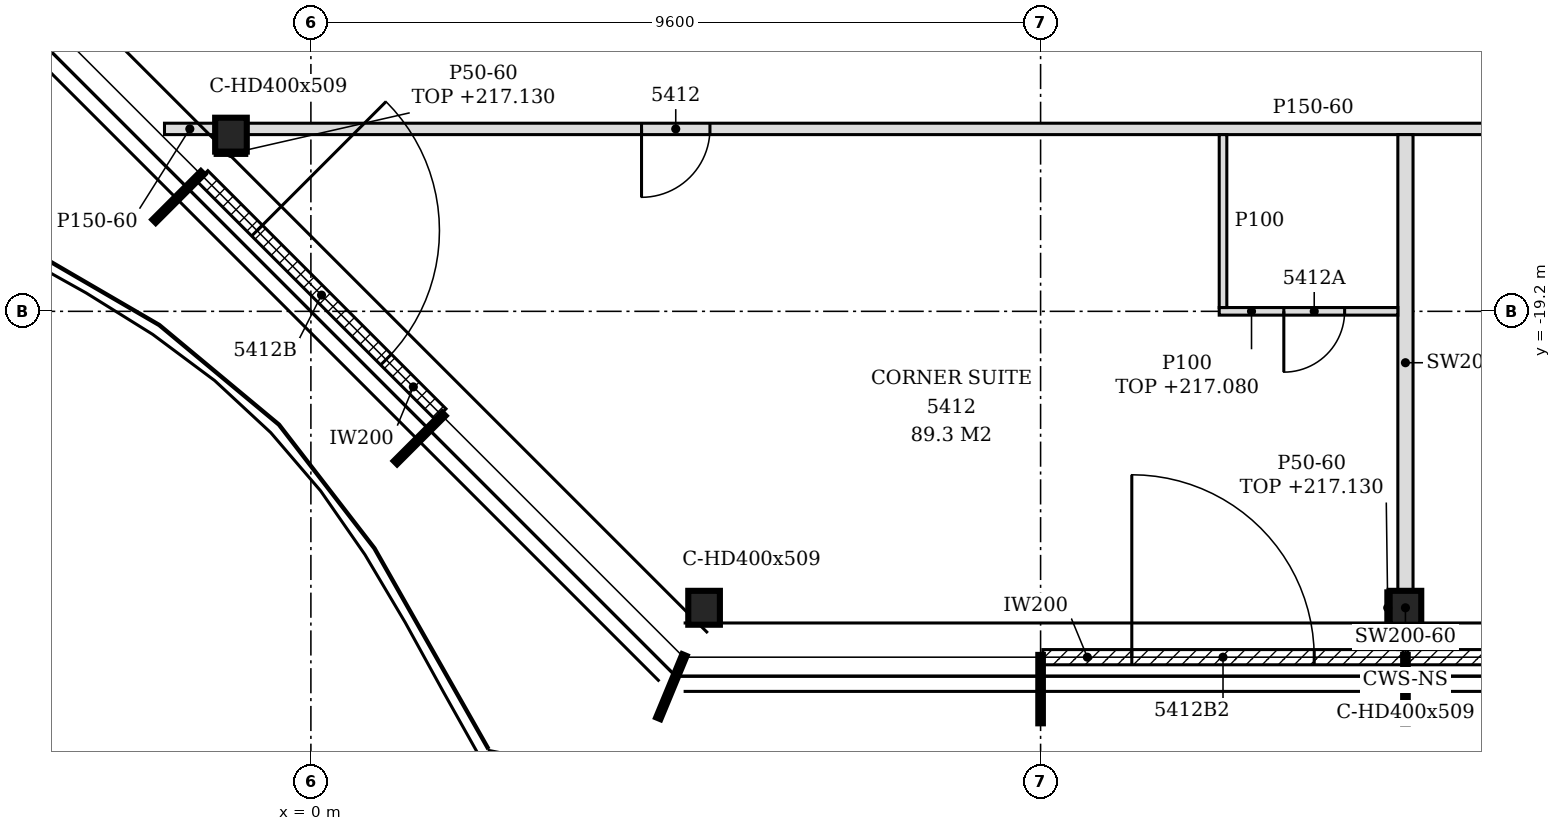
"""IFC4 building model, lengths in metres.
Left out: names, types, materials, properties, quantities, classifications, styles, units other than length and angle.
Written with IfcOpenShell. Run it as: python <this file> out.ifc"""

import sys

from ifc_helpers import new_model, si_unit, direction, frame, frame_2d, origin, origin_2d, place, context, subcontext, project, spatial, polyline, rectangle, i_section, outline, extrude, element, fill, save


model = new_model("IFC4")
c1 = context("Model", 3, precision=1e-05, world=origin(), true_north=direction((0.0, 1.0)))
c2 = subcontext(c1, "Body", "Model", "MODEL_VIEW")
j1 = project(units=[si_unit("LENGTHUNIT", "METRE"), si_unit("PLANEANGLEUNIT", "RADIAN")], contexts=[c1])
p1 = place(None, origin())
s1 = spatial("IfcSite", under=j1, at=p1, CompositionType="ELEMENT")
p2 = place(p1, origin())
s2 = spatial("IfcBuilding", under=s1, at=p2, CompositionType="ELEMENT")
p3 = place(p2, frame((0.0, 0.0, 214.2)))
s3 = spatial("IfcBuildingStorey", under=s2, at=p3, CompositionType="ELEMENT", Elevation=214.2)
for number, where, z_axis, x_axis in (
    (1, (5.173, -23.1, -0.15), (0.0, 0.0, 1.0), (1.0, 0.0, 0.0)),
    (2, (14.4, -23.1, -0.15), (0.0, 0.0, 1.0), (1.0, 0.0, 0.0)),
    (3, (-1.052, -16.876, -0.15), (0.0, 0.0, 1.0), (1.0, 0.0, 0.0)),
):
    element("IfcColumn", number, at=place(p3, frame(where, z_axis=z_axis, x_axis=x_axis)), inside=s3, PredefinedType="COLUMN", context=c2, shape_type="SweptSolid", body=[
        extrude(i_section(OverallWidth=0.416, OverallDepth=0.446, WebThickness=0.039, FlangeThickness=0.063, FilletRadius=0.015, at=origin_2d()), origin(), (0.0, 0.0, 1.0), 3.6),
    ])
p4 = place(p3, frame((9.63, -23.75, 0.0), z_axis=(0.0, 0.0, 1.0), x_axis=(1.0, 0.0, 0.0)))
e4 = element("IfcWall", 4, at=p4, inside=s3, PredefinedType="NOTDEFINED", context=c2, shape_type="SweptSolid", body=[
    extrude(rectangle(XDim=4.74, YDim=0.2, at=frame_2d((2.37, 0.0))), origin(), (0.0, 0.0, 1.0), 3.45),
])
p5 = place(p4, frame((1.17, 0.0, 0.0)))
e5 = element("IfcOpeningElement", 5, at=p5, cuts=e4, PredefinedType="OPENING", context=c2, shape_type="SweptSolid", body=[
    extrude(rectangle(XDim=2.4, YDim=2.4, at=frame_2d((1.2, 1.2))), frame((0.0, 0.11, 0.0), z_axis=(0.0, -1.0, 0.0), x_axis=(1.0, 0.0, 0.0)), (0.0, 0.0, 1.0), 0.22),
])
p6 = place(p3, frame((14.43, -23.75, 0.0), z_axis=(0.0, 0.0, 1.0), x_axis=(1.0, 0.0, 0.0)))
e6 = element("IfcWall", 6, at=p6, inside=s3, PredefinedType="NOTDEFINED", context=c2, shape_type="SweptSolid", body=[
    extrude(rectangle(XDim=4.74, YDim=0.2, at=frame_2d((2.37, 0.0))), origin(), (0.0, 0.0, 1.0), 3.45),
])
p7 = place(p6, frame((1.17, 0.0, 0.0)))
e7 = element("IfcOpeningElement", 7, at=p7, cuts=e6, PredefinedType="OPENING", context=c2, shape_type="SweptSolid", body=[
    extrude(rectangle(XDim=2.4, YDim=2.4, at=frame_2d((1.2, 1.2))), frame((0.0, 0.11, 0.0), z_axis=(0.0, -1.0, 0.0), x_axis=(1.0, 0.0, 0.0)), (0.0, 0.0, 1.0), 0.22),
])
p8 = place(p3, frame((-1.427, -17.42, 0.0), z_axis=(0.0, 0.0, 1.0), x_axis=(0.707106781187, -0.707106781187, 0.0)))
e8 = element("IfcWall", 8, at=p8, inside=s3, PredefinedType="NOTDEFINED", context=c2, shape_type="SweptSolid", body=[
    extrude(rectangle(XDim=4.431, YDim=0.2, at=frame_2d((2.216, 0.0))), origin(), (0.0, 0.0, 1.0), 3.45),
])
p9 = place(p8, frame((1.015, 0.0, 0.0)))
e9 = element("IfcOpeningElement", 9, at=p9, cuts=e8, PredefinedType="OPENING", context=c2, shape_type="SweptSolid", body=[
    extrude(rectangle(XDim=2.4, YDim=2.4, at=frame_2d((1.2, 1.2))), frame((0.0, 0.11, 0.0), z_axis=(0.0, -1.0, 0.0), x_axis=(1.0, 0.0, 0.0)), (0.0, 0.0, 1.0), 0.22),
])
p10 = place(p3, frame((14.4, -23.65, 0.0), z_axis=(0.0, 0.0, 1.0), x_axis=(0.0, 1.0, 0.0)))
e10 = element("IfcWall", 10, at=p10, inside=s3, PredefinedType="PARTITIONING", context=c2, shape_type="SweptSolid", body=[
    extrude(rectangle(XDim=0.327, YDim=0.2, at=frame_2d((0.164, 0.0))), origin(), (0.0, 0.0, 1.0), 3.45),
])
p11 = place(p3, frame((14.4, -22.877, 0.0), z_axis=(0.0, 0.0, 1.0), x_axis=(0.0, 1.0, 0.0)))
e11 = element("IfcWall", 11, at=p11, inside=s3, PredefinedType="PARTITIONING", context=c2, shape_type="SweptSolid", body=[
    extrude(outline(polyline([(0.0, 0.0), (6.002, 0.0), (6.002, 3.45), (3.782, 3.45), (3.78, 2.88), (3.572, 2.88), (3.57, 3.45), (0.0, 3.45), (0.0, 0.0)])), frame((0.0, 0.1, 0.0), z_axis=(0.0, -1.0, 0.0), x_axis=(1.0, 0.0, 0.0)), (0.0, 0.0, 1.0), 0.2),
])
p12 = place(p3, frame((11.95, -19.2, 0.0), z_axis=(0.0, 0.0, 1.0), x_axis=(1.0, 0.0, 0.0)))
e12 = element("IfcWall", 12, at=p12, inside=s3, PredefinedType="PARTITIONING", context=c2, shape_type="SweptSolid", body=[
    extrude(rectangle(XDim=2.35, YDim=0.1, at=frame_2d((1.175, 0.0))), origin(), (0.0, 0.0, 1.0), 2.88),
])
p13 = place(p12, frame((0.85, 0.0, 0.0)))
e13 = element("IfcOpeningElement", 13, at=p13, cuts=e12, PredefinedType="OPENING", context=c2, shape_type="SweptSolid", body=[
    extrude(rectangle(XDim=0.8, YDim=2.1, at=frame_2d((0.4, 1.05))), frame((0.0, 0.06, 0.0), z_axis=(0.0, -1.0, 0.0), x_axis=(1.0, 0.0, 0.0)), (0.0, 0.0, 1.0), 0.12),
])
p14 = place(p3, frame((12.0, -19.15, 0.0), z_axis=(0.0, 0.0, 1.0), x_axis=(0.0, 1.0, 0.0)))
e14 = element("IfcWall", 14, at=p14, inside=s3, PredefinedType="PARTITIONING", context=c2, shape_type="SweptSolid", body=[
    extrude(outline(polyline([(0.0, 0.0), (2.275, 0.0), (2.275, 3.45), (0.055, 3.45), (0.053, 2.88), (0.0, 2.88), (0.0, 0.0)])), frame((0.0, 0.05, 0.0), z_axis=(0.0, -1.0, 0.0), x_axis=(1.0, 0.0, 0.0)), (0.0, 0.0, 1.0), 0.1),
])
p15 = place(p3, frame((-1.926, -16.8, 0.0), z_axis=(0.0, 0.0, 1.0), x_axis=(1.0, 0.0, 0.0)))
e15 = element("IfcWall", 15, at=p15, inside=s3, PredefinedType="PARTITIONING", context=c2, shape_type="SweptSolid", body=[
    extrude(outline(polyline([(0.0, 0.0), (0.667, 0.0), (0.667, 2.63), (0.229, 2.63), (0.227, 3.45), (0.0, 3.45), (0.0, 0.0)])), frame((0.0, 0.075, 0.0), z_axis=(0.0, -1.0, 0.0), x_axis=(1.0, 0.0, 0.0)), (0.0, 0.0, 1.0), 0.15),
])
p16 = place(p3, frame((-0.844, -16.8, 0.0), z_axis=(0.0, 0.0, 1.0), x_axis=(1.0, 0.0, 0.0)))
e16 = element("IfcWall", 16, at=p16, inside=s3, PredefinedType="PARTITIONING", context=c2, shape_type="SweptSolid", body=[
    extrude(outline(polyline([(0.0, 0.0), (21.968, 0.0), (21.968, 3.45), (20.194, 3.45), (20.191, 2.73), (19.894, 2.73), (19.892, 3.45), (8.194, 3.45), (8.191, 2.73), (7.894, 2.73), (7.892, 3.45), (0.0, 3.45), (0.0, 0.0)])), frame((0.0, 0.075, 0.0), z_axis=(0.0, -1.0, 0.0), x_axis=(1.0, 0.0, 0.0)), (0.0, 0.0, 1.0), 0.15),
])
p17 = place(p16, frame((5.194, 0.0, 0.0)))
e17 = element("IfcOpeningElement", 17, at=p17, cuts=e16, PredefinedType="OPENING", context=c2, shape_type="SweptSolid", body=[
    extrude(rectangle(XDim=0.9, YDim=2.1, at=frame_2d((0.45, 1.05))), frame((0.0, 0.085, 0.0), z_axis=(0.0, -1.0, 0.0), x_axis=(1.0, 0.0, 0.0)), (0.0, 0.0, 1.0), 0.17),
])
p18 = place(p3, frame((14.167, -23.323, 0.0), z_axis=(0.0, 0.0, 1.0), x_axis=(0.0, 1.0, 0.0)))
e18 = element("IfcWall", 18, at=p18, inside=s3, PredefinedType="PARTITIONING", context=c2, shape_type="SweptSolid", body=[
    extrude(rectangle(XDim=0.446, YDim=0.05, at=frame_2d((0.223, 0.0))), origin(), (0.0, 0.0, 1.0), 2.93),
])
p19 = place(p3, frame((-1.26, -17.124, 0.0), z_axis=(0.0, 0.0, 1.0), x_axis=(1.0, 0.0, 0.0)))
e19 = element("IfcWall", 19, at=p19, inside=s3, PredefinedType="PARTITIONING", context=c2, shape_type="SweptSolid", body=[
    extrude(rectangle(XDim=0.416, YDim=0.05, at=frame_2d((0.208, 0.0))), origin(), (0.0, 0.0, 1.0), 2.93),
])
p20 = place(p5, origin())
e20 = element("IfcDoor", 20, at=p20, inside=s3, OperationType="SINGLE_SWING_LEFT", PredefinedType="DOOR", context=c2, shape_type="SweptSolid", body=[
    extrude(rectangle(XDim=2.4, YDim=2.4, at=frame_2d((1.2, 1.2))), frame((0.0, 0.025, 0.0), z_axis=(0.0, -1.0, 0.0), x_axis=(1.0, 0.0, 0.0)), (0.0, 0.0, 1.0), 0.05),
])
fill(e5, e20)
p21 = place(p9, origin())
e21 = element("IfcDoor", 21, at=p21, inside=s3, OperationType="SINGLE_SWING_LEFT", PredefinedType="DOOR", context=c2, shape_type="SweptSolid", body=[
    extrude(rectangle(XDim=2.4, YDim=2.4, at=frame_2d((1.2, 1.2))), frame((0.0, 0.025, 0.0), z_axis=(0.0, -1.0, 0.0), x_axis=(1.0, 0.0, 0.0)), (0.0, 0.0, 1.0), 0.05),
])
fill(e9, e21)
p22 = place(p17, frame((0.9, 0.0, 0.0), z_axis=(0.0, 0.0, 1.0), x_axis=(-1.0, 0.0, 0.0)))
e22 = element("IfcDoor", 22, at=p22, inside=s3, OperationType="SINGLE_SWING_RIGHT", PredefinedType="DOOR", context=c2, shape_type="SweptSolid", body=[
    extrude(rectangle(XDim=0.9, YDim=2.1, at=frame_2d((0.45, 1.05))), frame((0.0, 0.025, 0.0), z_axis=(0.0, -1.0, 0.0), x_axis=(1.0, 0.0, 0.0)), (0.0, 0.0, 1.0), 0.05),
])
fill(e17, e22)
p23 = place(p13, frame((0.8, 0.0, 0.0), z_axis=(0.0, 0.0, 1.0), x_axis=(-1.0, 0.0, 0.0)))
e23 = element("IfcDoor", 23, at=p23, inside=s3, OperationType="SINGLE_SWING_RIGHT", PredefinedType="DOOR", context=c2, shape_type="SweptSolid", body=[
    extrude(rectangle(XDim=0.8, YDim=2.1, at=frame_2d((0.4, 1.05))), frame((0.0, 0.025, 0.0), z_axis=(0.0, -1.0, 0.0), x_axis=(1.0, 0.0, 0.0)), (0.0, 0.0, 1.0), 0.05),
])
fill(e13, e23)
save(model, sys.argv[1])
